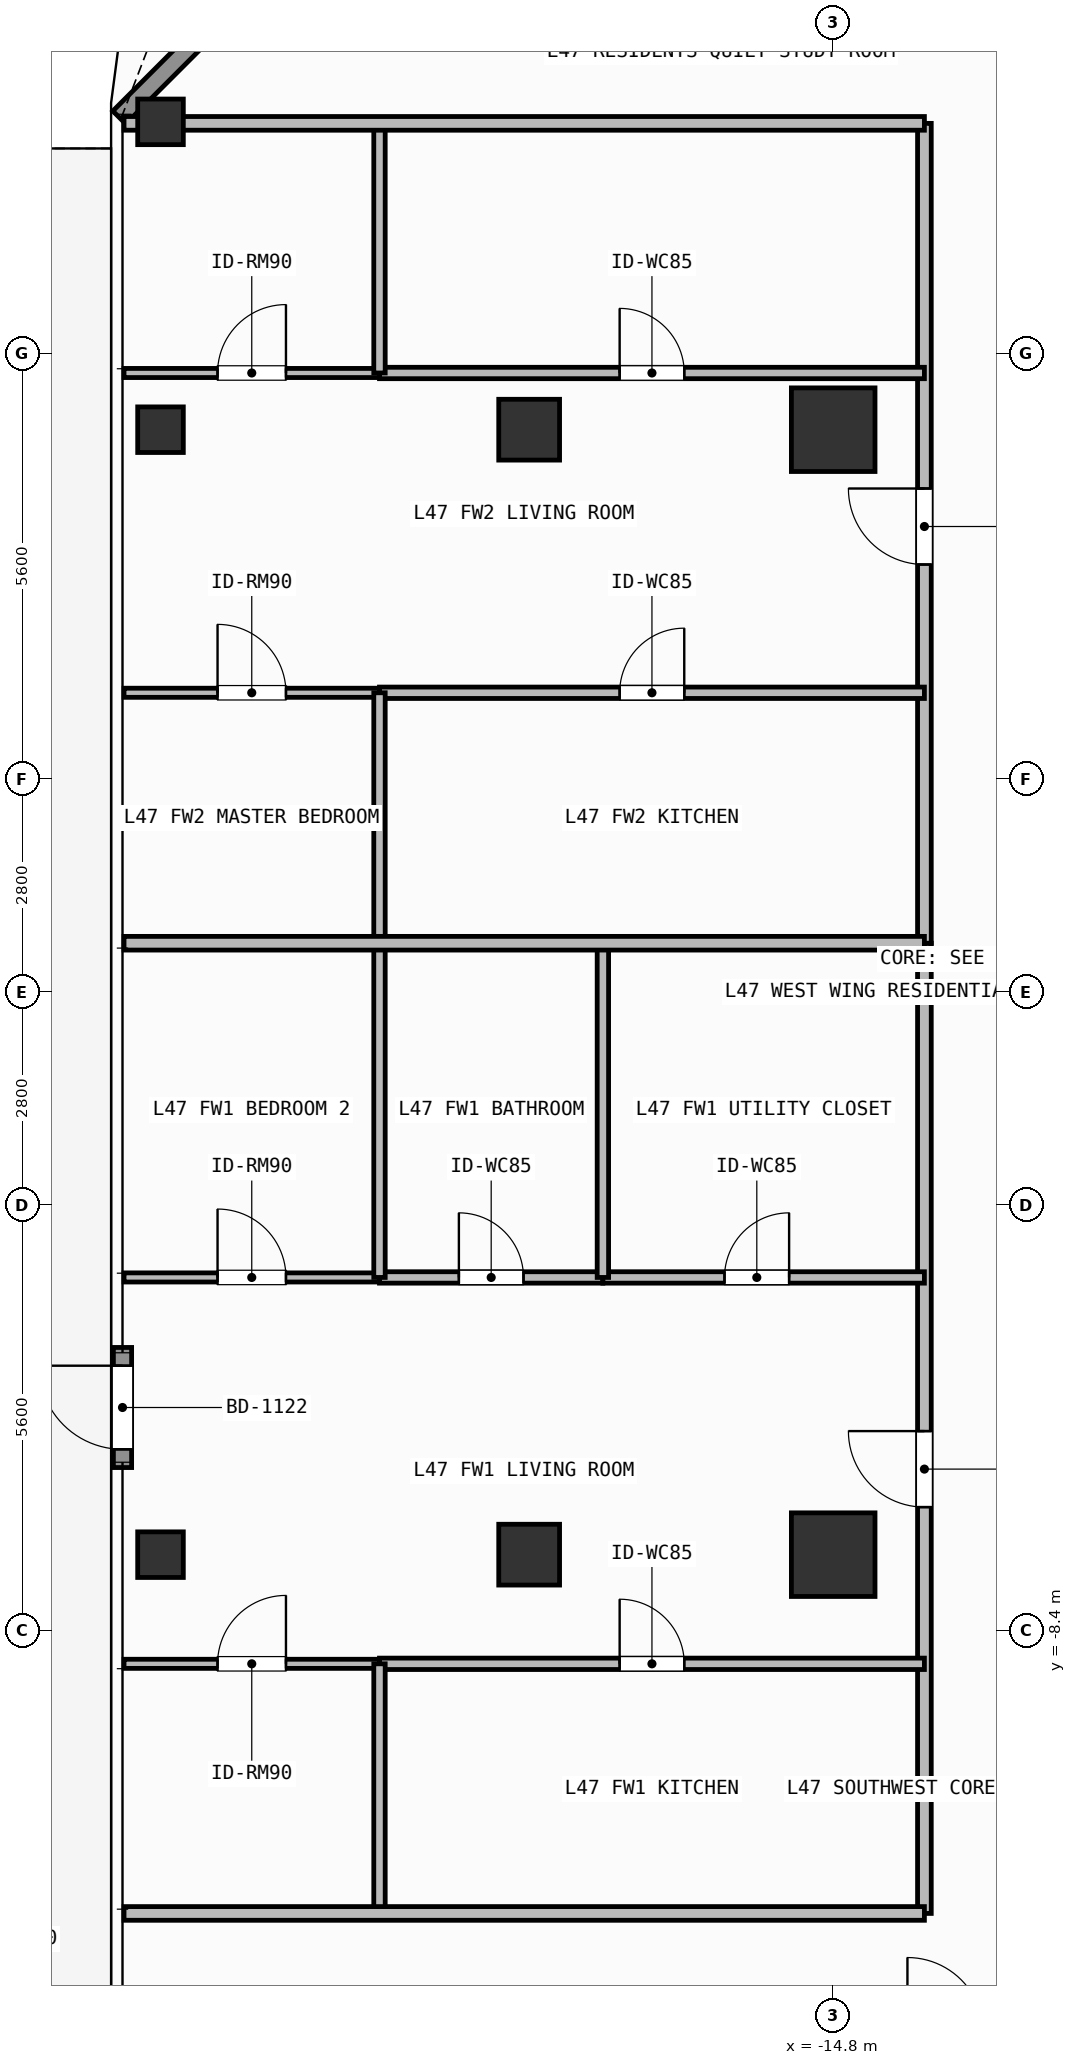
"""IFC4 building model, lengths in metres.
Left out: names, types, materials, properties, quantities, classifications, styles, units other than length and angle.
Written with IfcOpenShell. Run it as: python <this file> out.ifc"""

import sys

from ifc_helpers import new_model, si_unit, direction, frame, frame_2d, origin, origin_2d, place, context, subcontext, project, spatial, rectangle, hollow_rectangle, extrude, element, fill, save


model = new_model("IFC4")
c1 = context("Model", 3, precision=1e-05, world=origin(), true_north=direction((0.0, 1.0)))
c2 = subcontext(c1, "Body", "Model", "MODEL_VIEW")
j1 = project(units=[si_unit("LENGTHUNIT", "METRE"), si_unit("PLANEANGLEUNIT", "RADIAN")], contexts=[c1])
p1 = place(None, origin())
s1 = spatial("IfcSite", under=j1, at=p1, CompositionType="ELEMENT")
p2 = place(p1, origin())
s2 = spatial("IfcBuilding", under=s1, at=p2, CompositionType="ELEMENT")
p3 = place(p2, frame((0.0, 0.0, 191.4)))
s3 = spatial("IfcBuildingStorey", under=s2, at=p3, CompositionType="ELEMENT", Elevation=191.4)
for number, where, z_axis, x_axis in (
    (1, (-14.8, -7.4, 0.0), (0.0, 0.0, 1.0), (1.0, 0.0, 0.0)),
    (2, (-14.8, 7.4, 0.0), (0.0, 0.0, 1.0), (1.0, 0.0, 0.0)),
):
    element("IfcColumn", number, at=place(p3, frame(where, z_axis=z_axis, x_axis=x_axis)), inside=s3, PredefinedType="COLUMN", context=c2, shape_type="SweptSolid", body=[
        extrude(rectangle(XDim=1.1, YDim=1.1, at=origin_2d()), origin(), (0.0, 0.0, 1.0), 3.9),
    ])
for number, where, z_axis, x_axis in (
    (3, (-18.8, -7.4, 0.0), (0.0, 0.0, 1.0), (1.0, 0.0, 0.0)),
    (4, (-18.8, 7.4, 0.0), (0.0, 0.0, 1.0), (1.0, 0.0, 0.0)),
):
    element("IfcColumn", number, at=place(p3, frame(where, z_axis=z_axis, x_axis=x_axis)), inside=s3, PredefinedType="COLUMN", context=c2, shape_type="SweptSolid", body=[
        extrude(hollow_rectangle(XDim=0.8, YDim=0.8, WallThickness=0.036, at=origin_2d()), origin(), (0.0, 0.0, 1.0), 3.9),
    ])
for number, where, z_axis, x_axis in (
    (5, (-23.65, 11.45, 0.0), (0.0, 0.0, 1.0), (1.0, 0.0, 0.0)),
    (6, (-23.65, -7.4, 0.0), (0.0, 0.0, 1.0), (1.0, 0.0, 0.0)),
    (7, (-23.65, 7.4, 0.0), (0.0, 0.0, 1.0), (1.0, 0.0, 0.0)),
):
    element("IfcColumn", number, at=place(p3, frame(where, z_axis=z_axis, x_axis=x_axis)), inside=s3, PredefinedType="COLUMN", context=c2, shape_type="SweptSolid", body=[
        extrude(hollow_rectangle(XDim=0.6, YDim=0.6, WallThickness=0.028, at=origin_2d()), origin(), (0.0, 0.0, 1.0), 3.9),
    ])
p4 = place(p3, frame((-24.15, -6.254, 0.0), z_axis=(0.0, 0.0, 1.0), x_axis=(0.0, 1.0, 0.0)))
e8 = element("IfcWall", 8, at=p4, inside=s3, PredefinedType="SOLIDWALL", context=c2, shape_type="SweptSolid", body=[
    extrude(rectangle(XDim=1.58, YDim=0.24, at=frame_2d((0.79, 0.0))), origin(), (0.0, 0.0, 1.0), 3.68),
])
p5 = place(p4, frame((0.24, 0.0, 0.0)))
e9 = element("IfcOpeningElement", 9, at=p5, cuts=e8, PredefinedType="OPENING", context=c2, shape_type="SweptSolid", body=[
    extrude(rectangle(XDim=1.1, YDim=2.2, at=frame_2d((0.55, 1.1))), frame((0.0, 0.13, 0.0), z_axis=(0.0, -1.0, 0.0), x_axis=(1.0, 0.0, 0.0)), (0.0, 0.0, 1.0), 0.26),
])
p6 = place(p3, frame((-24.192, 11.508, 0.0), z_axis=(0.0, 0.0, 1.0), x_axis=(0.707106781187, 0.707106781187, 0.0)))
e10 = element("IfcWall", 10, at=p6, inside=s3, PredefinedType="SOLIDWALL", context=c2, shape_type="SweptSolid", body=[
    extrude(rectangle(XDim=6.201, YDim=0.24, at=frame_2d((3.101, 0.0))), origin(), (0.0, 0.0, 1.0), 3.68),
])
p7 = place(p6, frame((2.351, 0.0, 0.8)))
e11 = element("IfcOpeningElement", 11, at=p7, cuts=e10, PredefinedType="OPENING", context=c2, shape_type="SweptSolid", body=[
    extrude(rectangle(XDim=1.5, YDim=1.85, at=frame_2d((0.75, 0.925))), frame((0.0, 0.13, 0.0), z_axis=(0.0, -1.0, 0.0), x_axis=(1.0, 0.0, 0.0)), (0.0, 0.0, 1.0), 0.26),
])
p8 = place(p3, frame((-13.6, -12.12, 0.0), z_axis=(0.0, 0.0, 1.0), x_axis=(0.0, 1.0, 0.0)))
e12 = element("IfcWall", 12, at=p8, inside=s3, PredefinedType="PARTITIONING", context=c2, shape_type="SweptSolid", body=[
    extrude(rectangle(XDim=12.764, YDim=0.18, at=frame_2d((6.382, 0.0))), origin(), (0.0, 0.0, 1.0), 3.68),
])
p9 = place(p8, frame((5.346, 0.0, 0.0)))
e13 = element("IfcOpeningElement", 13, at=p9, cuts=e12, PredefinedType="OPENING", context=c2, shape_type="SweptSolid", body=[
    extrude(rectangle(XDim=1.0, YDim=2.2, at=frame_2d((0.5, 1.1))), frame((0.0, 0.1, 0.0), z_axis=(0.0, -1.0, 0.0), x_axis=(1.0, 0.0, 0.0)), (0.0, 0.0, 1.0), 0.2),
])
p10 = place(p3, frame((-20.769, -3.753, 0.0), z_axis=(0.0, 0.0, 1.0), x_axis=(1.0, 0.0, 0.0)))
e14 = element("IfcWall", 14, at=p10, inside=s3, PredefinedType="PARTITIONING", context=c2, shape_type="SweptSolid", body=[
    extrude(rectangle(XDim=2.939, YDim=0.15, at=frame_2d((1.469, 0.0))), origin(), (0.0, 0.0, 1.0), 3.68),
])
p11 = place(p10, frame((1.044, 0.0, 0.0)))
e15 = element("IfcOpeningElement", 15, at=p11, cuts=e14, PredefinedType="OPENING", context=c2, shape_type="SweptSolid", body=[
    extrude(rectangle(XDim=0.85, YDim=2.1, at=frame_2d((0.425, 1.05))), frame((0.0, 0.085, 0.0), z_axis=(0.0, -1.0, 0.0), x_axis=(1.0, 0.0, 0.0)), (0.0, 0.0, 1.0), 0.17),
])
p12 = place(p3, frame((-17.83, -3.753, 0.0), z_axis=(0.0, 0.0, 1.0), x_axis=(1.0, 0.0, 0.0)))
e16 = element("IfcWall", 16, at=p12, inside=s3, PredefinedType="PARTITIONING", context=c2, shape_type="SweptSolid", body=[
    extrude(rectangle(XDim=4.23, YDim=0.15, at=frame_2d((2.115, 0.0))), origin(), (0.0, 0.0, 1.0), 3.68),
])
p13 = place(p12, frame((1.6, 0.0, 0.0)))
e17 = element("IfcOpeningElement", 17, at=p13, cuts=e16, PredefinedType="OPENING", context=c2, shape_type="SweptSolid", body=[
    extrude(rectangle(XDim=0.85, YDim=2.1, at=frame_2d((0.425, 1.05))), frame((0.0, 0.085, 0.0), z_axis=(0.0, -1.0, 0.0), x_axis=(1.0, 0.0, 0.0)), (0.0, 0.0, 1.0), 0.17),
])
p14 = place(p3, frame((-20.769, -8.836, 0.0), z_axis=(0.0, 0.0, 1.0), x_axis=(1.0, 0.0, 0.0)))
e18 = element("IfcWall", 18, at=p14, inside=s3, PredefinedType="PARTITIONING", context=c2, shape_type="SweptSolid", body=[
    extrude(rectangle(XDim=7.169, YDim=0.15, at=frame_2d((3.584, 0.0))), origin(), (0.0, 0.0, 1.0), 3.68),
])
p15 = place(p14, frame((3.159, 0.0, 0.0)))
e19 = element("IfcOpeningElement", 19, at=p15, cuts=e18, PredefinedType="OPENING", context=c2, shape_type="SweptSolid", body=[
    extrude(rectangle(XDim=0.85, YDim=2.1, at=frame_2d((0.425, 1.05))), frame((0.0, 0.085, 0.0), z_axis=(0.0, -1.0, 0.0), x_axis=(1.0, 0.0, 0.0)), (0.0, 0.0, 1.0), 0.17),
])
p16 = place(p3, frame((-24.13, -8.836, 0.0), z_axis=(0.0, 0.0, 1.0), x_axis=(1.0, 0.0, 0.0)))
e20 = element("IfcWall", 20, at=p16, inside=s3, PredefinedType="PARTITIONING", context=c2, shape_type="SweptSolid", body=[
    extrude(rectangle(XDim=3.361, YDim=0.12, at=frame_2d((1.68, 0.0))), origin(), (0.0, 0.0, 1.0), 3.68),
])
p17 = place(p16, frame((1.23, 0.0, 0.0)))
e21 = element("IfcOpeningElement", 21, at=p17, cuts=e20, PredefinedType="OPENING", context=c2, shape_type="SweptSolid", body=[
    extrude(rectangle(XDim=0.9, YDim=2.1, at=frame_2d((0.45, 1.05))), frame((0.0, 0.07, 0.0), z_axis=(0.0, -1.0, 0.0), x_axis=(1.0, 0.0, 0.0)), (0.0, 0.0, 1.0), 0.14),
])
p18 = place(p3, frame((-24.13, -3.753, 0.0), z_axis=(0.0, 0.0, 1.0), x_axis=(1.0, 0.0, 0.0)))
e22 = element("IfcWall", 22, at=p18, inside=s3, PredefinedType="PARTITIONING", context=c2, shape_type="SweptSolid", body=[
    extrude(rectangle(XDim=3.361, YDim=0.12, at=frame_2d((1.68, 0.0))), origin(), (0.0, 0.0, 1.0), 3.68),
])
p19 = place(p18, frame((1.23, 0.0, 0.0)))
e23 = element("IfcOpeningElement", 23, at=p19, cuts=e22, PredefinedType="OPENING", context=c2, shape_type="SweptSolid", body=[
    extrude(rectangle(XDim=0.9, YDim=2.1, at=frame_2d((0.45, 1.05))), frame((0.0, 0.07, 0.0), z_axis=(0.0, -1.0, 0.0), x_axis=(1.0, 0.0, 0.0)), (0.0, 0.0, 1.0), 0.14),
])
p20 = place(p3, frame((-13.6, 0.644, 0.0), z_axis=(0.0, 0.0, 1.0), x_axis=(0.0, 1.0, 0.0)))
e24 = element("IfcWall", 24, at=p20, inside=s3, PredefinedType="PARTITIONING", context=c2, shape_type="SweptSolid", body=[
    extrude(rectangle(XDim=10.786, YDim=0.18, at=frame_2d((5.393, 0.0))), origin(), (0.0, 0.0, 1.0), 3.68),
])
p21 = place(p20, frame((4.982, 0.0, 0.0)))
e25 = element("IfcOpeningElement", 25, at=p21, cuts=e24, PredefinedType="OPENING", context=c2, shape_type="SweptSolid", body=[
    extrude(rectangle(XDim=1.0, YDim=2.2, at=frame_2d((0.5, 1.1))), frame((0.0, 0.1, 0.0), z_axis=(0.0, -1.0, 0.0), x_axis=(1.0, 0.0, 0.0)), (0.0, 0.0, 1.0), 0.2),
])
p22 = place(p3, frame((-20.769, 8.146, 0.0), z_axis=(0.0, 0.0, 1.0), x_axis=(1.0, 0.0, 0.0)))
e26 = element("IfcWall", 26, at=p22, inside=s3, PredefinedType="PARTITIONING", context=c2, shape_type="SweptSolid", body=[
    extrude(rectangle(XDim=7.169, YDim=0.15, at=frame_2d((3.584, 0.0))), origin(), (0.0, 0.0, 1.0), 3.68),
])
p23 = place(p22, frame((3.159, 0.0, 0.0)))
e27 = element("IfcOpeningElement", 27, at=p23, cuts=e26, PredefinedType="OPENING", context=c2, shape_type="SweptSolid", body=[
    extrude(rectangle(XDim=0.85, YDim=2.1, at=frame_2d((0.425, 1.05))), frame((0.0, 0.085, 0.0), z_axis=(0.0, -1.0, 0.0), x_axis=(1.0, 0.0, 0.0)), (0.0, 0.0, 1.0), 0.17),
])
p24 = place(p3, frame((-20.769, 3.939, 0.0), z_axis=(0.0, 0.0, 1.0), x_axis=(1.0, 0.0, 0.0)))
e28 = element("IfcWall", 28, at=p24, inside=s3, PredefinedType="PARTITIONING", context=c2, shape_type="SweptSolid", body=[
    extrude(rectangle(XDim=7.169, YDim=0.15, at=frame_2d((3.584, 0.0))), origin(), (0.0, 0.0, 1.0), 3.68),
])
p25 = place(p24, frame((3.159, 0.0, 0.0)))
e29 = element("IfcOpeningElement", 29, at=p25, cuts=e28, PredefinedType="OPENING", context=c2, shape_type="SweptSolid", body=[
    extrude(rectangle(XDim=0.85, YDim=2.1, at=frame_2d((0.425, 1.05))), frame((0.0, 0.085, 0.0), z_axis=(0.0, -1.0, 0.0), x_axis=(1.0, 0.0, 0.0)), (0.0, 0.0, 1.0), 0.17),
])
p26 = place(p3, frame((-24.13, 3.939, 0.0), z_axis=(0.0, 0.0, 1.0), x_axis=(1.0, 0.0, 0.0)))
e30 = element("IfcWall", 30, at=p26, inside=s3, PredefinedType="PARTITIONING", context=c2, shape_type="SweptSolid", body=[
    extrude(rectangle(XDim=3.361, YDim=0.12, at=frame_2d((1.68, 0.0))), origin(), (0.0, 0.0, 1.0), 3.68),
])
p27 = place(p26, frame((1.23, 0.0, 0.0)))
e31 = element("IfcOpeningElement", 31, at=p27, cuts=e30, PredefinedType="OPENING", context=c2, shape_type="SweptSolid", body=[
    extrude(rectangle(XDim=0.9, YDim=2.1, at=frame_2d((0.45, 1.05))), frame((0.0, 0.07, 0.0), z_axis=(0.0, -1.0, 0.0), x_axis=(1.0, 0.0, 0.0)), (0.0, 0.0, 1.0), 0.14),
])
p28 = place(p3, frame((-24.13, 8.146, 0.0), z_axis=(0.0, 0.0, 1.0), x_axis=(1.0, 0.0, 0.0)))
e32 = element("IfcWall", 32, at=p28, inside=s3, PredefinedType="PARTITIONING", context=c2, shape_type="SweptSolid", body=[
    extrude(rectangle(XDim=3.361, YDim=0.12, at=frame_2d((1.68, 0.0))), origin(), (0.0, 0.0, 1.0), 3.68),
])
p29 = place(p28, frame((1.23, 0.0, 0.0)))
e33 = element("IfcOpeningElement", 33, at=p29, cuts=e32, PredefinedType="OPENING", context=c2, shape_type="SweptSolid", body=[
    extrude(rectangle(XDim=0.9, YDim=2.1, at=frame_2d((0.45, 1.05))), frame((0.0, 0.07, 0.0), z_axis=(0.0, -1.0, 0.0), x_axis=(1.0, 0.0, 0.0)), (0.0, 0.0, 1.0), 0.14),
])
p30 = place(p3, frame((-17.83, -3.753, 0.0), z_axis=(0.0, 0.0, 1.0), x_axis=(0.0, 1.0, 0.0)))
e34 = element("IfcWall", 34, at=p30, inside=s3, PredefinedType="PARTITIONING", context=c2, shape_type="SweptSolid", body=[
    extrude(rectangle(XDim=4.397, YDim=0.15, at=frame_2d((2.198, 0.0))), origin(), (0.0, 0.0, 1.0), 3.68),
])
p31 = place(p3, frame((-20.769, -12.12, 0.0), z_axis=(0.0, 0.0, 1.0), x_axis=(0.0, 1.0, 0.0)))
e35 = element("IfcWall", 35, at=p31, inside=s3, PredefinedType="PARTITIONING", context=c2, shape_type="SweptSolid", body=[
    extrude(rectangle(XDim=3.284, YDim=0.15, at=frame_2d((1.642, 0.0))), origin(), (0.0, 0.0, 1.0), 3.68),
])
p32 = place(p3, frame((-20.769, -3.753, 0.0), z_axis=(0.0, 0.0, 1.0), x_axis=(0.0, 1.0, 0.0)))
e36 = element("IfcWall", 36, at=p32, inside=s3, PredefinedType="PARTITIONING", context=c2, shape_type="SweptSolid", body=[
    extrude(rectangle(XDim=4.397, YDim=0.15, at=frame_2d((2.198, 0.0))), origin(), (0.0, 0.0, 1.0), 3.68),
])
p33 = place(p3, frame((-20.769, 0.644, 0.0), z_axis=(0.0, 0.0, 1.0), x_axis=(0.0, 1.0, 0.0)))
e37 = element("IfcWall", 37, at=p33, inside=s3, PredefinedType="PARTITIONING", context=c2, shape_type="SweptSolid", body=[
    extrude(rectangle(XDim=3.295, YDim=0.15, at=frame_2d((1.647, 0.0))), origin(), (0.0, 0.0, 1.0), 3.68),
])
p34 = place(p3, frame((-20.769, 8.146, 0.0), z_axis=(0.0, 0.0, 1.0), x_axis=(0.0, 1.0, 0.0)))
e38 = element("IfcWall", 38, at=p34, inside=s3, PredefinedType="PARTITIONING", context=c2, shape_type="SweptSolid", body=[
    extrude(rectangle(XDim=3.284, YDim=0.15, at=frame_2d((1.642, 0.0))), origin(), (0.0, 0.0, 1.0), 3.68),
])
for number, where, z_axis, x_axis in (
    (39, (-24.13, 0.644, 0.0), (0.0, 0.0, 1.0), (1.0, 0.0, 0.0)),
    (40, (-24.13, -12.12, 0.0), (0.0, 0.0, 1.0), (1.0, 0.0, 0.0)),
):
    element("IfcWall", number, at=place(p3, frame(where, z_axis=z_axis, x_axis=x_axis)), inside=s3, PredefinedType="PARTITIONING", context=c2, shape_type="SweptSolid", body=[
        extrude(rectangle(XDim=10.53, YDim=0.18, at=frame_2d((5.265, 0.0))), origin(), (0.0, 0.0, 1.0), 3.68),
    ])
p35 = place(p3, frame((-24.13, 11.43, 0.0), z_axis=(0.0, 0.0, 1.0), x_axis=(1.0, 0.0, 0.0)))
e41 = element("IfcWall", 41, at=p35, inside=s3, PredefinedType="PARTITIONING", context=c2, shape_type="SweptSolid", body=[
    extrude(rectangle(XDim=10.53, YDim=0.18, at=frame_2d((5.265, 0.0))), origin(), (0.0, 0.0, 1.0), 3.42),
])
p36 = place(p5, origin())
e42 = element("IfcDoor", 42, at=p36, inside=s3, OperationType="SINGLE_SWING_RIGHT", PredefinedType="DOOR", context=c2, shape_type="SweptSolid", body=[
    extrude(rectangle(XDim=1.1, YDim=2.2, at=frame_2d((0.55, 1.1))), frame((0.0, 0.025, 0.0), z_axis=(0.0, -1.0, 0.0), x_axis=(1.0, 0.0, 0.0)), (0.0, 0.0, 1.0), 0.05),
])
fill(e9, e42)
p37 = place(p9, origin())
e43 = element("IfcDoor", 43, at=p37, inside=s3, OperationType="SINGLE_SWING_RIGHT", PredefinedType="DOOR", context=c2, shape_type="SweptSolid", body=[
    extrude(rectangle(XDim=1.0, YDim=2.2, at=frame_2d((0.5, 1.1))), frame((0.0, 0.025, 0.0), z_axis=(0.0, -1.0, 0.0), x_axis=(1.0, 0.0, 0.0)), (0.0, 0.0, 1.0), 0.05),
])
fill(e13, e43)
p38 = place(p11, origin())
e44 = element("IfcDoor", 44, at=p38, inside=s3, OperationType="SINGLE_SWING_LEFT", PredefinedType="DOOR", context=c2, shape_type="SweptSolid", body=[
    extrude(rectangle(XDim=0.85, YDim=2.1, at=frame_2d((0.425, 1.05))), frame((0.0, 0.025, 0.0), z_axis=(0.0, -1.0, 0.0), x_axis=(1.0, 0.0, 0.0)), (0.0, 0.0, 1.0), 0.05),
])
fill(e15, e44)
p39 = place(p13, origin())
e45 = element("IfcDoor", 45, at=p39, inside=s3, OperationType="SINGLE_SWING_RIGHT", PredefinedType="DOOR", context=c2, shape_type="SweptSolid", body=[
    extrude(rectangle(XDim=0.85, YDim=2.1, at=frame_2d((0.425, 1.05))), frame((0.0, 0.025, 0.0), z_axis=(0.0, -1.0, 0.0), x_axis=(1.0, 0.0, 0.0)), (0.0, 0.0, 1.0), 0.05),
])
fill(e17, e45)
p40 = place(p15, origin())
e46 = element("IfcDoor", 46, at=p40, inside=s3, OperationType="SINGLE_SWING_LEFT", PredefinedType="DOOR", context=c2, shape_type="SweptSolid", body=[
    extrude(rectangle(XDim=0.85, YDim=2.1, at=frame_2d((0.425, 1.05))), frame((0.0, 0.025, 0.0), z_axis=(0.0, -1.0, 0.0), x_axis=(1.0, 0.0, 0.0)), (0.0, 0.0, 1.0), 0.05),
])
fill(e19, e46)
p41 = place(p17, origin())
e47 = element("IfcDoor", 47, at=p41, inside=s3, OperationType="SINGLE_SWING_RIGHT", PredefinedType="DOOR", context=c2, shape_type="SweptSolid", body=[
    extrude(rectangle(XDim=0.9, YDim=2.1, at=frame_2d((0.45, 1.05))), frame((0.0, 0.025, 0.0), z_axis=(0.0, -1.0, 0.0), x_axis=(1.0, 0.0, 0.0)), (0.0, 0.0, 1.0), 0.05),
])
fill(e21, e47)
p42 = place(p19, origin())
e48 = element("IfcDoor", 48, at=p42, inside=s3, OperationType="SINGLE_SWING_LEFT", PredefinedType="DOOR", context=c2, shape_type="SweptSolid", body=[
    extrude(rectangle(XDim=0.9, YDim=2.1, at=frame_2d((0.45, 1.05))), frame((0.0, 0.025, 0.0), z_axis=(0.0, -1.0, 0.0), x_axis=(1.0, 0.0, 0.0)), (0.0, 0.0, 1.0), 0.05),
])
fill(e23, e48)
p43 = place(p21, origin())
e49 = element("IfcDoor", 49, at=p43, inside=s3, OperationType="SINGLE_SWING_RIGHT", PredefinedType="DOOR", context=c2, shape_type="SweptSolid", body=[
    extrude(rectangle(XDim=1.0, YDim=2.2, at=frame_2d((0.5, 1.1))), frame((0.0, 0.025, 0.0), z_axis=(0.0, -1.0, 0.0), x_axis=(1.0, 0.0, 0.0)), (0.0, 0.0, 1.0), 0.05),
])
fill(e25, e49)
p44 = place(p23, origin())
e50 = element("IfcDoor", 50, at=p44, inside=s3, OperationType="SINGLE_SWING_LEFT", PredefinedType="DOOR", context=c2, shape_type="SweptSolid", body=[
    extrude(rectangle(XDim=0.85, YDim=2.1, at=frame_2d((0.425, 1.05))), frame((0.0, 0.025, 0.0), z_axis=(0.0, -1.0, 0.0), x_axis=(1.0, 0.0, 0.0)), (0.0, 0.0, 1.0), 0.05),
])
fill(e27, e50)
p45 = place(p25, origin())
e51 = element("IfcDoor", 51, at=p45, inside=s3, OperationType="SINGLE_SWING_RIGHT", PredefinedType="DOOR", context=c2, shape_type="SweptSolid", body=[
    extrude(rectangle(XDim=0.85, YDim=2.1, at=frame_2d((0.425, 1.05))), frame((0.0, 0.025, 0.0), z_axis=(0.0, -1.0, 0.0), x_axis=(1.0, 0.0, 0.0)), (0.0, 0.0, 1.0), 0.05),
])
fill(e29, e51)
p46 = place(p27, origin())
e52 = element("IfcDoor", 52, at=p46, inside=s3, OperationType="SINGLE_SWING_LEFT", PredefinedType="DOOR", context=c2, shape_type="SweptSolid", body=[
    extrude(rectangle(XDim=0.9, YDim=2.1, at=frame_2d((0.45, 1.05))), frame((0.0, 0.025, 0.0), z_axis=(0.0, -1.0, 0.0), x_axis=(1.0, 0.0, 0.0)), (0.0, 0.0, 1.0), 0.05),
])
fill(e31, e52)
p47 = place(p29, origin())
e53 = element("IfcDoor", 53, at=p47, inside=s3, OperationType="SINGLE_SWING_RIGHT", PredefinedType="DOOR", context=c2, shape_type="SweptSolid", body=[
    extrude(rectangle(XDim=0.9, YDim=2.1, at=frame_2d((0.45, 1.05))), frame((0.0, 0.025, 0.0), z_axis=(0.0, -1.0, 0.0), x_axis=(1.0, 0.0, 0.0)), (0.0, 0.0, 1.0), 0.05),
])
fill(e33, e53)
save(model, sys.argv[1])
